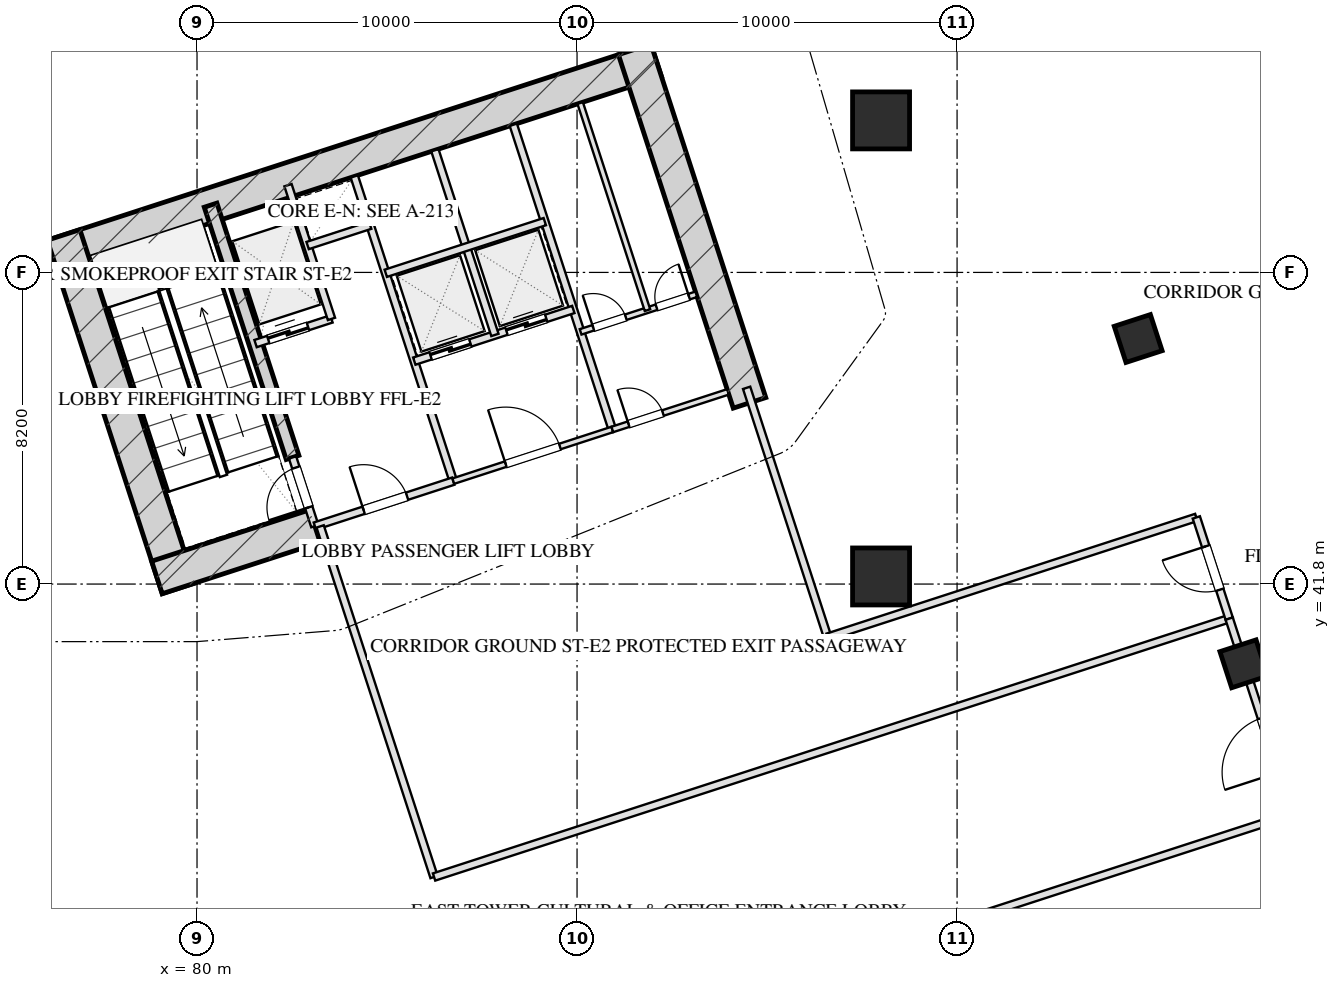
"""IFC4 building model, lengths in metres.
Left out: names, types, materials, properties, quantities, classifications, styles, units other than length and angle.
Written with IfcOpenShell. Run it as: python <this file> out.ifc"""

import sys

from ifc_helpers import new_model, si_unit, direction, frame, frame_2d, origin, origin_2d, place, context, subcontext, project, spatial, rectangle, hollow_rectangle, extrude, element, fill, save


model = new_model("IFC4")
c1 = context("Model", 3, precision=1e-05, world=origin(), true_north=direction((0.0, 1.0)))
c2 = subcontext(c1, "Body", "Model", "MODEL_VIEW")
j1 = project(units=[si_unit("LENGTHUNIT", "METRE"), si_unit("PLANEANGLEUNIT", "RADIAN")], contexts=[c1])
p1 = place(None, origin())
s1 = spatial("IfcSite", under=j1, at=p1, CompositionType="ELEMENT")
p2 = place(p1, origin())
s2 = spatial("IfcBuilding", under=s1, at=p2, CompositionType="ELEMENT")
p3 = place(p2, origin())
s3 = spatial("IfcBuildingStorey", under=s2, at=p3, CompositionType="ELEMENT", Elevation=0.0)
p4 = place(p3, frame((76.201, 50.419, 0.0), z_axis=(0.0, 0.0, 1.0), x_axis=(0.951056412142, 0.309017314926, 0.0)))
e1 = element("IfcWall", 1, at=p4, inside=s3, PredefinedType="SHEAR", context=c2, shape_type="SweptSolid", body=[
    extrude(rectangle(XDim=16.7, YDim=0.9, at=frame_2d((8.35, 0.0))), origin(), (0.0, 0.0, 1.0), 6.0),
])
for number, where, z_axis, x_axis in (
    (2, (79.512, 41.685, 0.0), (0.0, 0.0, 1.0), (-0.309, 0.951, 0.0)),
    (3, (94.539, 46.568, 0.0), (0.0, 0.0, 1.0), (-0.309, 0.951, 0.0)),
):
    element("IfcWall", number, at=place(p3, frame(where, z_axis=z_axis, x_axis=x_axis)), inside=s3, PredefinedType="SHEAR", context=c2, shape_type="SweptSolid", body=[
        extrude(rectangle(XDim=9.78, YDim=0.9, at=frame_2d((4.89, 0.0))), origin(), (0.0, 0.0, 1.0), 6.0),
    ])
p5 = place(p3, frame((82.514, 45.131, 0.0), z_axis=(0.0, 0.0, 1.0), x_axis=(-0.308988790936, 0.951065679686, 0.0)))
e4 = element("IfcWall", 4, at=p5, inside=s3, PredefinedType="SHEAR", context=c2, shape_type="SweptSolid", body=[
    extrude(rectangle(XDim=6.98, YDim=0.35, at=frame_2d((3.49, 0.0))), origin(), (0.0, 0.0, 1.0), 6.0),
])
p6 = place(p3, frame((78.945, 41.974, 0.0), z_axis=(0.0, 0.0, 1.0), x_axis=(0.951058289404, 0.309011537255, 0.0)))
e5 = element("IfcWall", 5, at=p6, inside=s3, PredefinedType="SHEAR", context=c2, shape_type="SweptSolid", body=[
    extrude(rectangle(XDim=4.37, YDim=0.9, at=frame_2d((2.185, 0.0))), origin(), (0.0, 0.0, 1.0), 6.0),
])
for number, where, z_axis, x_axis in (
    (6, (98.0, 42.0, 0.0), (0.0, 0.0, 1.0), (1.0, 0.0, 0.0)),
    (7, (98.0, 54.0, 0.0), (0.0, 0.0, 1.0), (1.0, 0.0, 0.0)),
):
    element("IfcColumn", number, at=place(p3, frame(where, z_axis=z_axis, x_axis=x_axis)), inside=s3, PredefinedType="COLUMN", context=c2, shape_type="SweptSolid", body=[
        extrude(rectangle(XDim=1.5, YDim=1.5, at=origin_2d()), origin(), (0.0, 0.0, 1.0), 6.001),
    ])
for number, where, z_axis, x_axis in (
    (8, (107.547, 39.701, 0.0), (0.0, 0.0, 1.0), (0.951, 0.309, 0.0)),
    (9, (104.766, 48.261, 0.0), (0.0, 0.0, 1.0), (0.951, 0.309, 0.0)),
):
    element("IfcColumn", number, at=place(p3, frame(where, z_axis=z_axis, x_axis=x_axis)), inside=s3, PredefinedType="COLUMN", context=c2, shape_type="SweptSolid", body=[
        extrude(hollow_rectangle(XDim=1.0, YDim=1.0, WallThickness=0.036, at=origin_2d()), origin(), (0.0, 0.0, 1.0), 6.001),
    ])
p7 = place(p3, frame((83.101, 43.324, 0.0), z_axis=(0.0, 0.0, 1.0), x_axis=(-0.309048298632, 0.951046344356, 0.0)))
e10 = element("IfcWall", 10, at=p7, inside=s3, PredefinedType="PARTITIONING", context=c2, shape_type="SweptSolid", body=[
    extrude(rectangle(XDim=1.9, YDim=0.2, at=frame_2d((0.95, 0.0))), origin(), (0.0, 0.0, 1.0), 5.685),
])
p8 = place(p7, frame((0.52, 0.0, 0.0)))
e11 = element("IfcOpeningElement", 11, at=p8, cuts=e10, PredefinedType="OPENING", context=c2, shape_type="SweptSolid", body=[
    extrude(rectangle(XDim=1.1, YDim=2.05, at=frame_2d((0.55, 1.025))), frame((0.0, 0.11, 0.0), z_axis=(0.0, -1.0, 0.0), x_axis=(1.0, 0.0, 0.0)), (0.0, 0.0, 1.0), 0.22),
])
p9 = place(p3, frame((86.743, 44.508, 0.0), z_axis=(0.0, 0.0, 1.0), x_axis=(-0.309016001439, 0.951056838919, 0.0)))
e12 = element("IfcWall", 12, at=p9, inside=s3, PredefinedType="PARTITIONING", context=c2, shape_type="SweptSolid", body=[
    extrude(rectangle(XDim=8.43, YDim=0.2, at=frame_2d((4.215, 0.0))), origin(), (0.0, 0.0, 1.0), 5.685),
])
p10 = place(p3, frame((83.101, 43.324, 0.0), z_axis=(0.0, 0.0, 1.0), x_axis=(0.951052804469, 0.309028417967, 0.0)))
e13 = element("IfcWall", 13, at=p10, inside=s3, PredefinedType="PARTITIONING", context=c2, shape_type="SweptSolid", body=[
    extrude(rectangle(XDim=3.83, YDim=0.2, at=frame_2d((1.915, 0.0))), origin(), (0.0, 0.0, 1.0), 5.685),
])
p11 = place(p10, frame((1.35, 0.0, 0.0)))
e14 = element("IfcOpeningElement", 14, at=p11, cuts=e13, PredefinedType="OPENING", context=c2, shape_type="SweptSolid", body=[
    extrude(rectangle(XDim=1.2, YDim=2.05, at=frame_2d((0.6, 1.025))), frame((0.0, 0.11, 0.0), z_axis=(0.0, -1.0, 0.0), x_axis=(1.0, 0.0, 0.0)), (0.0, 0.0, 1.0), 0.22),
])
p12 = place(p3, frame((81.54, 48.127, 0.0), z_axis=(0.0, 0.0, 1.0), x_axis=(0.951062257173, 0.308999325213, 0.0)))
e15 = element("IfcWall", 15, at=p12, inside=s3, PredefinedType="PARTITIONING", context=c2, shape_type="SweptSolid", body=[
    extrude(rectangle(XDim=2.1, YDim=0.2, at=frame_2d((1.05, 0.0))), origin(), (0.0, 0.0, 1.0), 5.685),
])
p13 = place(p12, frame((0.35, 0.0, 0.0)))
e16 = element("IfcOpeningElement", 16, at=p13, cuts=e15, PredefinedType="OPENING", context=c2, shape_type="SweptSolid", body=[
    extrude(rectangle(XDim=1.1, YDim=2.05, at=frame_2d((0.55, 1.025))), frame((0.0, 0.11, 0.0), z_axis=(0.0, -1.0, 0.0), x_axis=(1.0, 0.0, 0.0)), (0.0, 0.0, 1.0), 0.22),
])
p14 = place(p3, frame((83.538, 48.776, 0.0), z_axis=(0.0, 0.0, 1.0), x_axis=(-0.3089935693, 0.951064127245, 0.0)))
e17 = element("IfcWall", 17, at=p14, inside=s3, PredefinedType="PARTITIONING", context=c2, shape_type="SweptSolid", body=[
    extrude(rectangle(XDim=3.7, YDim=0.2, at=frame_2d((1.85, 0.0))), origin(), (0.0, 0.0, 1.0), 5.685),
])
p15 = place(p3, frame((82.91, 50.707, 0.0), z_axis=(0.0, 0.0, 1.0), x_axis=(0.951041328149, 0.309063734775, 0.0)))
e18 = element("IfcWall", 18, at=p15, inside=s3, PredefinedType="PARTITIONING", context=c2, shape_type="SweptSolid", body=[
    extrude(rectangle(XDim=1.73, YDim=0.2, at=frame_2d((0.865, 0.0))), origin(), (0.0, 0.0, 1.0), 5.685),
])
p16 = place(p3, frame((90.928, 45.868, 0.0), z_axis=(0.0, 0.0, 1.0), x_axis=(-0.309042196757, 0.951048327176, 0.0)))
e19 = element("IfcWall", 19, at=p16, inside=s3, PredefinedType="PARTITIONING", context=c2, shape_type="SweptSolid", body=[
    extrude(rectangle(XDim=8.43, YDim=0.2, at=frame_2d((4.215, 0.0))), origin(), (0.0, 0.0, 1.0), 5.685),
])
p17 = place(p3, frame((86.743, 44.508, 0.0), z_axis=(0.0, 0.0, 1.0), x_axis=(0.951063829732, 0.308994485023, 0.0)))
e20 = element("IfcWall", 20, at=p17, inside=s3, PredefinedType="PARTITIONING", context=c2, shape_type="SweptSolid", body=[
    extrude(rectangle(XDim=4.4, YDim=0.15, at=frame_2d((2.2, 0.0))), origin(), (0.0, 0.0, 1.0), 5.685),
])
p18 = place(p17, frame((1.45, 0.0, 0.0)))
e21 = element("IfcOpeningElement", 21, at=p18, cuts=e20, PredefinedType="OPENING", context=c2, shape_type="SweptSolid", body=[
    extrude(rectangle(XDim=1.5, YDim=2.05, at=frame_2d((0.75, 1.025))), frame((0.0, 0.085, 0.0), z_axis=(0.0, -1.0, 0.0), x_axis=(1.0, 0.0, 0.0)), (0.0, 0.0, 1.0), 0.17),
])
p19 = place(p3, frame((85.718, 47.666, 0.0), z_axis=(0.0, 0.0, 1.0), x_axis=(0.951058531764, 0.30901079133, 0.0)))
e22 = element("IfcWall", 22, at=p19, inside=s3, PredefinedType="PARTITIONING", context=c2, shape_type="SweptSolid", body=[
    extrude(rectangle(XDim=4.4, YDim=0.2, at=frame_2d((2.2, 0.0))), origin(), (0.0, 0.0, 1.0), 5.685),
])
p20 = place(p19, frame((0.45, 0.0, 0.0)))
e23 = element("IfcOpeningElement", 23, at=p20, cuts=e22, PredefinedType="OPENING", context=c2, shape_type="SweptSolid", body=[
    extrude(rectangle(XDim=1.1, YDim=2.05, at=frame_2d((0.55, 1.025))), frame((0.0, 0.11, 0.0), z_axis=(0.0, -1.0, 0.0), x_axis=(1.0, 0.0, 0.0)), (0.0, 0.0, 1.0), 0.22),
])
p21 = place(p19, frame((2.55, 0.0, 0.0)))
e24 = element("IfcOpeningElement", 24, at=p21, cuts=e22, PredefinedType="OPENING", context=c2, shape_type="SweptSolid", body=[
    extrude(rectangle(XDim=1.1, YDim=2.05, at=frame_2d((0.55, 1.025))), frame((0.0, 0.11, 0.0), z_axis=(0.0, -1.0, 0.0), x_axis=(1.0, 0.0, 0.0)), (0.0, 0.0, 1.0), 0.22),
])
p22 = place(p3, frame((87.838, 48.354, 0.0), z_axis=(0.0, 0.0, 1.0), x_axis=(-0.3090093719, 0.951058992953, 0.0)))
e25 = element("IfcWall", 25, at=p22, inside=s3, PredefinedType="PARTITIONING", context=c2, shape_type="SweptSolid", body=[
    extrude(rectangle(XDim=5.11, YDim=0.2, at=frame_2d((2.555, 0.0))), origin(), (0.0, 0.0, 1.0), 5.685),
])
p23 = place(p3, frame((84.967, 49.977, 0.0), z_axis=(0.0, 0.0, 1.0), x_axis=(0.951063829732, 0.308994485023, 0.0)))
e26 = element("IfcWall", 26, at=p23, inside=s3, PredefinedType="PARTITIONING", context=c2, shape_type="SweptSolid", body=[
    extrude(rectangle(XDim=4.4, YDim=0.2, at=frame_2d((2.2, 0.0))), origin(), (0.0, 0.0, 1.0), 5.685),
])
p24 = place(p3, frame((90.928, 45.868, 0.0), z_axis=(0.0, 0.0, 1.0), x_axis=(0.951059297078, 0.309008435874, 0.0)))
e27 = element("IfcWall", 27, at=p24, inside=s3, PredefinedType="PARTITIONING", context=c2, shape_type="SweptSolid", body=[
    extrude(rectangle(XDim=3.2, YDim=0.15, at=frame_2d((1.6, 0.0))), origin(), (0.0, 0.0, 1.0), 5.685),
])
p25 = place(p24, frame((0.45, 0.0, 0.0)))
e28 = element("IfcOpeningElement", 28, at=p25, cuts=e27, PredefinedType="OPENING", context=c2, shape_type="SweptSolid", body=[
    extrude(rectangle(XDim=0.95, YDim=2.05, at=frame_2d((0.475, 1.025))), frame((0.0, 0.085, 0.0), z_axis=(0.0, -1.0, 0.0), x_axis=(1.0, 0.0, 0.0)), (0.0, 0.0, 1.0), 0.17),
])
p26 = place(p3, frame((90.094, 48.436, 0.0), z_axis=(0.0, 0.0, 1.0), x_axis=(0.951066581729, 0.308986014439, 0.0)))
e29 = element("IfcWall", 29, at=p26, inside=s3, PredefinedType="PARTITIONING", context=c2, shape_type="SweptSolid", body=[
    extrude(rectangle(XDim=3.2, YDim=0.15, at=frame_2d((1.6, 0.0))), origin(), (0.0, 0.0, 1.0), 5.685),
])
p27 = place(p26, frame((0.35, 0.0, 0.0)))
e30 = element("IfcOpeningElement", 30, at=p27, cuts=e29, PredefinedType="OPENING", context=c2, shape_type="SweptSolid", body=[
    extrude(rectangle(XDim=0.9, YDim=2.05, at=frame_2d((0.45, 1.025))), frame((0.0, 0.085, 0.0), z_axis=(0.0, -1.0, 0.0), x_axis=(1.0, 0.0, 0.0)), (0.0, 0.0, 1.0), 0.17),
])
p28 = place(p26, frame((2.1, 0.0, 0.0)))
e31 = element("IfcOpeningElement", 31, at=p28, cuts=e29, PredefinedType="OPENING", context=c2, shape_type="SweptSolid", body=[
    extrude(rectangle(XDim=0.9, YDim=2.05, at=frame_2d((0.45, 1.025))), frame((0.0, 0.085, 0.0), z_axis=(0.0, -1.0, 0.0), x_axis=(1.0, 0.0, 0.0)), (0.0, 0.0, 1.0), 0.17),
])
p29 = place(p3, frame((91.853, 49.007, 0.0), z_axis=(0.0, 0.0, 1.0), x_axis=(-0.309022487551, 0.951054731437, 0.0)))
e32 = element("IfcWall", 32, at=p29, inside=s3, PredefinedType="PARTITIONING", context=c2, shape_type="SweptSolid", body=[
    extrude(rectangle(XDim=5.73, YDim=0.15, at=frame_2d((2.865, 0.0))), origin(), (0.0, 0.0, 1.0), 5.685),
])
p30 = place(p3, frame((87.906, 28.956, 0.0), z_axis=(0.0, 0.0, 1.0), x_axis=(0.951056330024, 0.309017567658, 0.0)))
e33 = element("IfcWall", 33, at=p30, inside=s3, PredefinedType="PARTITIONING", context=c2, shape_type="SweptSolid", body=[
    extrude(rectangle(XDim=22.0, YDim=0.2, at=frame_2d((11.0, 0.0))), origin(), (0.0, 0.0, 1.0), 5.685),
])
p31 = place(p3, frame((99.963, 30.035, 0.0), z_axis=(0.0, 0.0, 1.0), x_axis=(0.951061328589, 0.309002183266, 0.0)))
e34 = element("IfcWall", 34, at=p31, inside=s3, PredefinedType="PARTITIONING", context=c2, shape_type="SweptSolid", body=[
    extrude(rectangle(XDim=10.2, YDim=0.2, at=frame_2d((5.1, 0.0))), origin(), (0.0, 0.0, 1.0), 5.685),
])
p32 = place(p3, frame((86.238, 34.092, 0.0), z_axis=(0.0, 0.0, 1.0), x_axis=(-0.309022900594, 0.951054597228, 0.0)))
e35 = element("IfcWall", 35, at=p32, inside=s3, PredefinedType="PARTITIONING", context=c2, shape_type="SweptSolid", body=[
    extrude(rectangle(XDim=9.7, YDim=0.2, at=frame_2d((4.85, 0.0))), origin(), (0.0, 0.0, 1.0), 5.685),
])
p33 = place(p3, frame((86.238, 34.092, 0.0), z_axis=(0.0, 0.0, 1.0), x_axis=(0.951056330024, 0.309017567658, 0.0)))
e36 = element("IfcWall", 36, at=p33, inside=s3, PredefinedType="PARTITIONING", context=c2, shape_type="SweptSolid", body=[
    extrude(rectangle(XDim=22.0, YDim=0.2, at=frame_2d((11.0, 0.0))), origin(), (0.0, 0.0, 1.0), 5.685),
])
p34 = place(p3, frame((94.462, 46.963, 0.0), z_axis=(0.0, 0.0, 1.0), x_axis=(0.309032467762, -0.951051488548, 0.0)))
e37 = element("IfcWall", 37, at=p34, inside=s3, PredefinedType="PARTITIONING", context=c2, shape_type="SweptSolid", body=[
    extrude(rectangle(XDim=6.9, YDim=0.2, at=frame_2d((3.45, 0.0))), origin(), (0.0, 0.0, 1.0), 5.685),
])
p35 = place(p3, frame((96.595, 40.401, 0.0), z_axis=(0.0, 0.0, 1.0), x_axis=(0.951052008584, 0.309030867339, 0.0)))
e38 = element("IfcWall", 38, at=p35, inside=s3, PredefinedType="PARTITIONING", context=c2, shape_type="SweptSolid", body=[
    extrude(rectangle(XDim=10.2, YDim=0.2, at=frame_2d((5.1, 0.0))), origin(), (0.0, 0.0, 1.0), 4.675),
])
p36 = place(p3, frame((107.161, 40.89, 0.0), z_axis=(0.0, 0.0, 1.0), x_axis=(-0.308999325213, 0.951062257173, 0.0)))
e39 = element("IfcWall", 39, at=p36, inside=s3, PredefinedType="PARTITIONING", context=c2, shape_type="SweptSolid", body=[
    extrude(rectangle(XDim=2.8, YDim=0.2, at=frame_2d((1.4, 0.0))), origin(), (0.0, 0.0, 1.0), 5.685),
])
p37 = place(p36, frame((0.8, 0.0, 0.0)))
e40 = element("IfcOpeningElement", 40, at=p37, cuts=e39, PredefinedType="OPENING", context=c2, shape_type="SweptSolid", body=[
    extrude(rectangle(XDim=1.2, YDim=2.05, at=frame_2d((0.6, 1.025))), frame((0.0, 0.11, 0.0), z_axis=(0.0, -1.0, 0.0), x_axis=(1.0, 0.0, 0.0)), (0.0, 0.0, 1.0), 0.22),
])
p38 = place(p3, frame((108.829, 35.754, 0.0), z_axis=(0.0, 0.0, 1.0), x_axis=(-0.309016555588, 0.951056658866, 0.0)))
e41 = element("IfcWall", 41, at=p38, inside=s3, PredefinedType="PARTITIONING", context=c2, shape_type="SweptSolid", body=[
    extrude(rectangle(XDim=5.4, YDim=0.2, at=frame_2d((2.7, 0.0))), origin(), (0.0, 0.0, 1.0), 5.685),
])
p39 = place(p38, frame((1.15, 0.0, 0.0)))
e42 = element("IfcOpeningElement", 42, at=p39, cuts=e41, PredefinedType="OPENING", context=c2, shape_type="SweptSolid", body=[
    extrude(rectangle(XDim=1.5, YDim=2.05, at=frame_2d((0.75, 1.025))), frame((0.0, 0.11, 0.0), z_axis=(0.0, -1.0, 0.0), x_axis=(1.0, 0.0, 0.0)), (0.0, 0.0, 1.0), 0.22),
])
p40 = place(p8, origin())
e43 = element("IfcDoor", 43, at=p40, inside=s3, OperationType="SINGLE_SWING_LEFT", PredefinedType="DOOR", context=c2, shape_type="SweptSolid", body=[
    extrude(rectangle(XDim=1.1, YDim=2.05, at=frame_2d((0.55, 1.025))), frame((0.0, 0.025, 0.0), z_axis=(0.0, -1.0, 0.0), x_axis=(1.0, 0.0, 0.0)), (0.0, 0.0, 1.0), 0.05),
])
fill(e11, e43)
p41 = place(p11, origin())
e44 = element("IfcDoor", 44, at=p41, inside=s3, OperationType="SINGLE_SWING_LEFT", PredefinedType="DOOR", context=c2, shape_type="SweptSolid", body=[
    extrude(rectangle(XDim=1.2, YDim=2.05, at=frame_2d((0.6, 1.025))), frame((0.0, 0.025, 0.0), z_axis=(0.0, -1.0, 0.0), x_axis=(1.0, 0.0, 0.0)), (0.0, 0.0, 1.0), 0.05),
])
fill(e14, e44)
p42 = place(p13, origin())
e45 = element("IfcDoor", 45, at=p42, inside=s3, OperationType="DOUBLE_DOOR_SLIDING", PredefinedType="DOOR", context=c2, shape_type="SweptSolid", body=[
    extrude(rectangle(XDim=1.1, YDim=2.05, at=frame_2d((0.55, 1.025))), frame((0.0, 0.025, 0.0), z_axis=(0.0, -1.0, 0.0), x_axis=(1.0, 0.0, 0.0)), (0.0, 0.0, 1.0), 0.05),
])
fill(e16, e45)
p43 = place(p18, origin())
e46 = element("IfcDoor", 46, at=p43, inside=s3, OperationType="SINGLE_SWING_LEFT", PredefinedType="DOOR", context=c2, shape_type="SweptSolid", body=[
    extrude(rectangle(XDim=1.5, YDim=2.05, at=frame_2d((0.75, 1.025))), frame((0.0, 0.025, 0.0), z_axis=(0.0, -1.0, 0.0), x_axis=(1.0, 0.0, 0.0)), (0.0, 0.0, 1.0), 0.05),
])
fill(e21, e46)
p44 = place(p20, origin())
e47 = element("IfcDoor", 47, at=p44, inside=s3, OperationType="DOUBLE_DOOR_SLIDING", PredefinedType="DOOR", context=c2, shape_type="SweptSolid", body=[
    extrude(rectangle(XDim=1.1, YDim=2.05, at=frame_2d((0.55, 1.025))), frame((0.0, 0.025, 0.0), z_axis=(0.0, -1.0, 0.0), x_axis=(1.0, 0.0, 0.0)), (0.0, 0.0, 1.0), 0.05),
])
fill(e23, e47)
p45 = place(p21, origin())
e48 = element("IfcDoor", 48, at=p45, inside=s3, OperationType="DOUBLE_DOOR_SLIDING", PredefinedType="DOOR", context=c2, shape_type="SweptSolid", body=[
    extrude(rectangle(XDim=1.1, YDim=2.05, at=frame_2d((0.55, 1.025))), frame((0.0, 0.025, 0.0), z_axis=(0.0, -1.0, 0.0), x_axis=(1.0, 0.0, 0.0)), (0.0, 0.0, 1.0), 0.05),
])
fill(e24, e48)
p46 = place(p25, origin())
e49 = element("IfcDoor", 49, at=p46, inside=s3, OperationType="SINGLE_SWING_LEFT", PredefinedType="DOOR", context=c2, shape_type="SweptSolid", body=[
    extrude(rectangle(XDim=0.95, YDim=2.05, at=frame_2d((0.475, 1.025))), frame((0.0, 0.025, 0.0), z_axis=(0.0, -1.0, 0.0), x_axis=(1.0, 0.0, 0.0)), (0.0, 0.0, 1.0), 0.05),
])
fill(e28, e49)
p47 = place(p27, origin())
e50 = element("IfcDoor", 50, at=p47, inside=s3, OperationType="SINGLE_SWING_LEFT", PredefinedType="DOOR", context=c2, shape_type="SweptSolid", body=[
    extrude(rectangle(XDim=0.9, YDim=2.05, at=frame_2d((0.45, 1.025))), frame((0.0, 0.025, 0.0), z_axis=(0.0, -1.0, 0.0), x_axis=(1.0, 0.0, 0.0)), (0.0, 0.0, 1.0), 0.05),
])
fill(e30, e50)
p48 = place(p28, origin())
e51 = element("IfcDoor", 51, at=p48, inside=s3, OperationType="SINGLE_SWING_RIGHT", PredefinedType="DOOR", context=c2, shape_type="SweptSolid", body=[
    extrude(rectangle(XDim=0.9, YDim=2.05, at=frame_2d((0.45, 1.025))), frame((0.0, 0.025, 0.0), z_axis=(0.0, -1.0, 0.0), x_axis=(1.0, 0.0, 0.0)), (0.0, 0.0, 1.0), 0.05),
])
fill(e31, e51)
p49 = place(p37, origin())
e52 = element("IfcDoor", 52, at=p49, inside=s3, OperationType="SINGLE_SWING_RIGHT", PredefinedType="DOOR", context=c2, shape_type="SweptSolid", body=[
    extrude(rectangle(XDim=1.2, YDim=2.05, at=frame_2d((0.6, 1.025))), frame((0.0, 0.025, 0.0), z_axis=(0.0, -1.0, 0.0), x_axis=(1.0, 0.0, 0.0)), (0.0, 0.0, 1.0), 0.05),
])
fill(e40, e52)
p50 = place(p39, origin())
e53 = element("IfcDoor", 53, at=p50, inside=s3, OperationType="SINGLE_SWING_LEFT", PredefinedType="DOOR", context=c2, shape_type="SweptSolid", body=[
    extrude(rectangle(XDim=1.5, YDim=2.05, at=frame_2d((0.75, 1.025))), frame((0.0, 0.025, 0.0), z_axis=(0.0, -1.0, 0.0), x_axis=(1.0, 0.0, 0.0)), (0.0, 0.0, 1.0), 0.05),
])
fill(e42, e53)
save(model, sys.argv[1])
